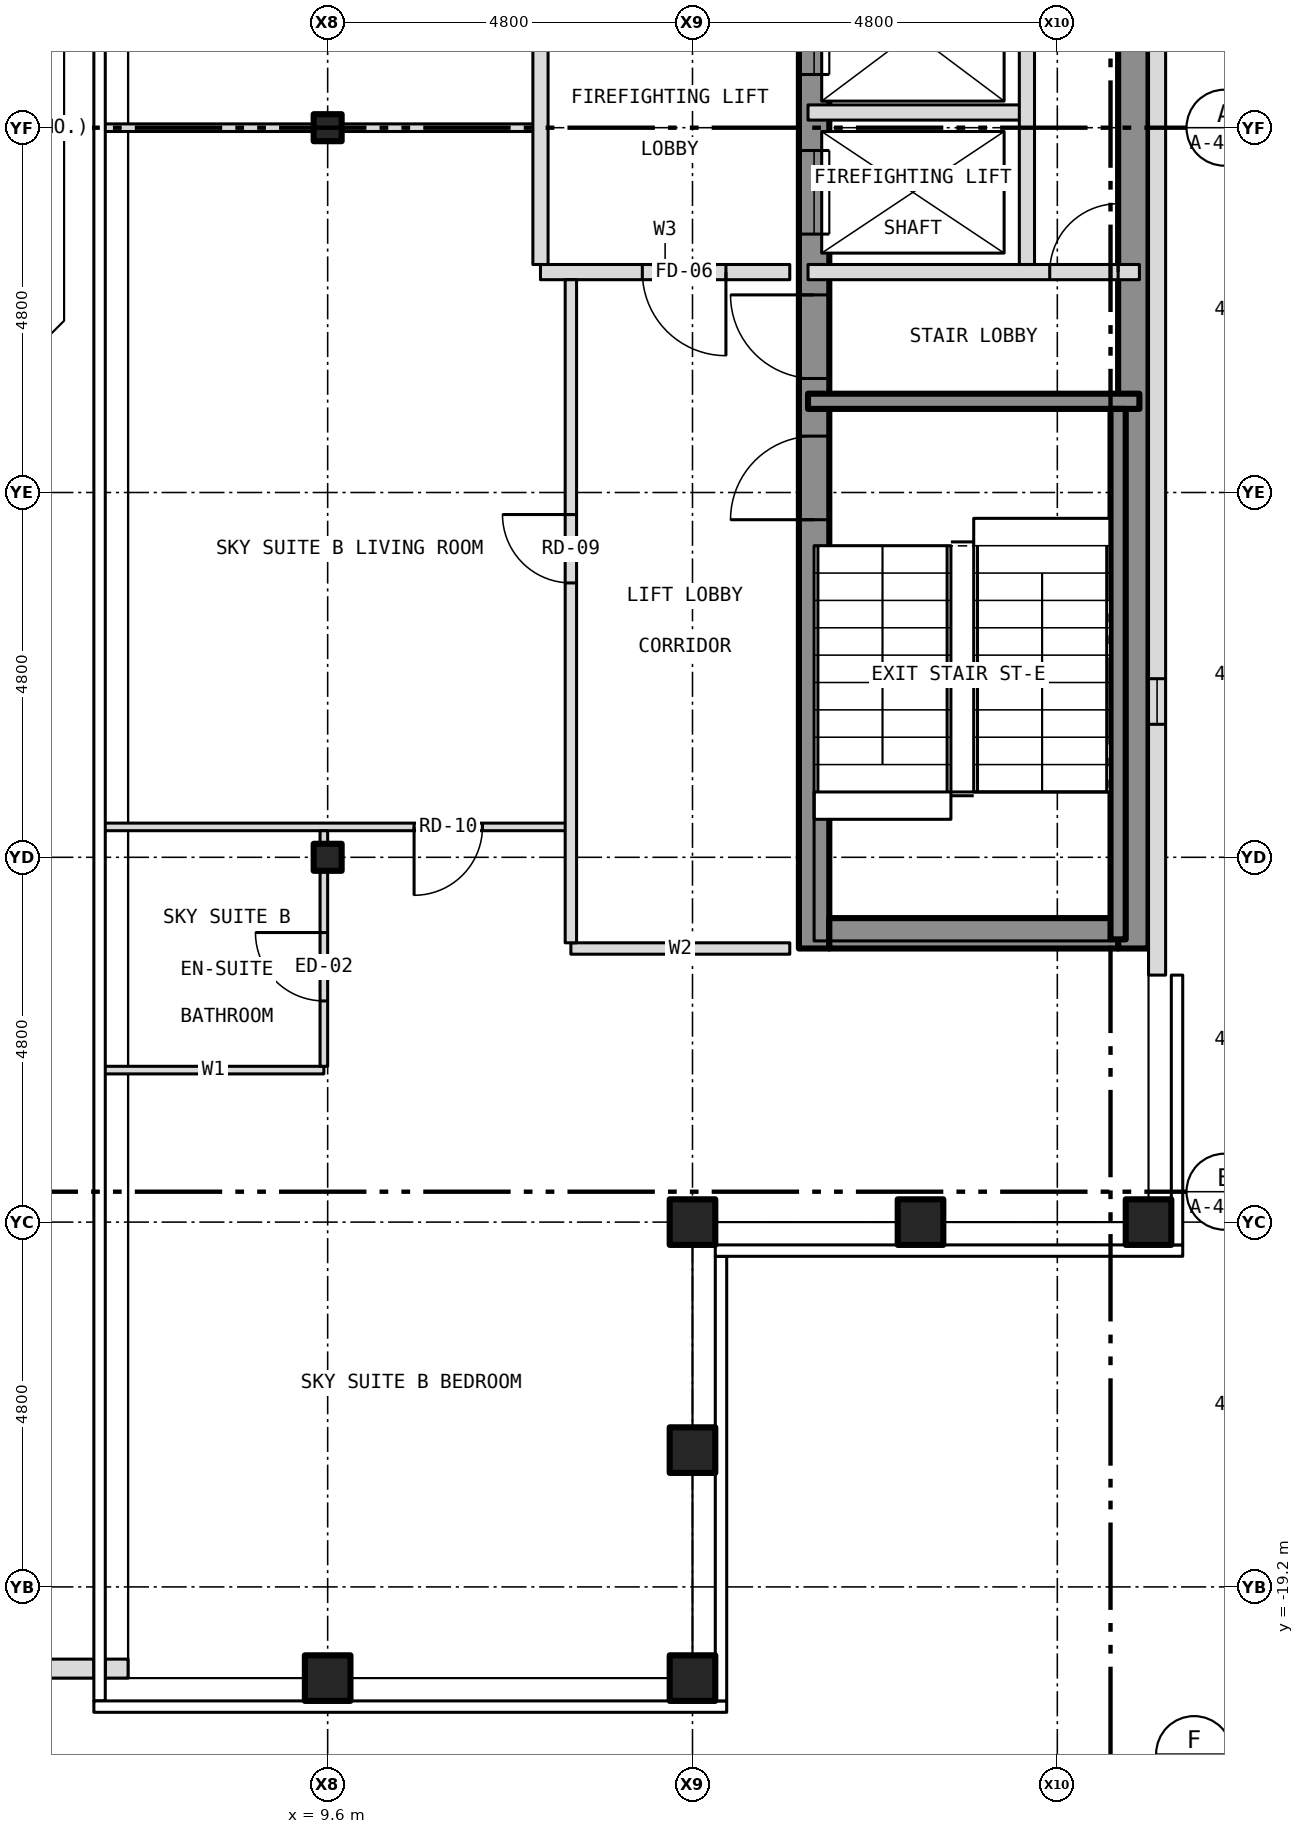
"""IFC4 building model, lengths in metres.
Left out: names, types, materials, properties, quantities, classifications, styles, units other than length and angle.
Written with IfcOpenShell. Run it as: python <this file> out.ifc"""

import sys

from ifc_helpers import new_model, si_unit, direction, frame, frame_2d, origin, origin_2d, place, context, subcontext, project, spatial, rectangle, hollow_rectangle, i_section, extrude, element, fill, save


model = new_model("IFC4")
c1 = context("Model", 3, precision=1e-05, world=origin(), true_north=direction((0.0, 1.0)))
c2 = subcontext(c1, "Body", "Model", "MODEL_VIEW")
j1 = project(units=[si_unit("LENGTHUNIT", "METRE"), si_unit("PLANEANGLEUNIT", "RADIAN")], contexts=[c1])
p1 = place(None, origin())
s1 = spatial("IfcSite", under=j1, at=p1, CompositionType="ELEMENT")
p2 = place(p1, origin())
s2 = spatial("IfcBuilding", under=s1, at=p2, CompositionType="ELEMENT")
p3 = place(p2, frame((0.0, 0.0, 265.5)))
s3 = spatial("IfcBuildingStorey", under=s2, at=p3, CompositionType="ELEMENT", Elevation=265.5)
for number, where, z_axis, x_axis in (
    (1, (9.6, -20.4, -0.25), (0.0, 0.0, 1.0), (1.0, 0.0, 0.0)),
    (2, (14.4, -20.4, -0.25), (0.0, 0.0, 1.0), (1.0, 0.0, 0.0)),
    (3, (20.4, -14.4, -0.25), (0.0, 0.0, 1.0), (1.0, 0.0, 0.0)),
    (4, (14.4, -14.4, -0.25), (0.0, 0.0, 1.0), (1.0, 0.0, 0.0)),
    (5, (14.4, -17.4, -0.25), (0.0, 0.0, 1.0), (1.0, 0.0, 0.0)),
    (6, (17.4, -14.4, -0.25), (0.0, 0.0, 1.0), (1.0, 0.0, 0.0)),
):
    element("IfcColumn", number, at=place(p3, frame(where, z_axis=z_axis, x_axis=x_axis)), inside=s3, PredefinedType="COLUMN", context=c2, shape_type="SweptSolid", body=[
        extrude(hollow_rectangle(XDim=0.6, YDim=0.6, WallThickness=0.03, at=origin_2d()), origin(), (0.0, 0.0, 1.0), 3.6),
    ])
for number, where, z_axis, x_axis in (
    (7, (9.6, -9.6, -0.25), (0.0, 0.0, 1.0), (1.0, 0.0, 0.0)),
    (8, (9.6, 0.0, -0.25), (0.0, 0.0, 1.0), (1.0, 0.0, 0.0)),
):
    element("IfcColumn", number, at=place(p3, frame(where, z_axis=z_axis, x_axis=x_axis)), inside=s3, PredefinedType="COLUMN", context=c2, shape_type="SweptSolid", body=[
        extrude(i_section(OverallWidth=0.368, OverallDepth=0.356, WebThickness=0.011, FlangeThickness=0.018, at=origin_2d()), origin(), (0.0, 0.0, 1.0), 3.6),
    ])
p4 = place(p3, frame((16.0, -10.8, 0.0), z_axis=(0.0, 0.0, 1.0), x_axis=(0.0, 1.0, 0.0)))
e9 = element("IfcWall", 9, at=p4, inside=s3, PredefinedType="SHEAR", context=c2, shape_type="SweptSolid", body=[
    extrude(rectangle(XDim=21.6, YDim=0.4, at=frame_2d((10.8, 0.0))), origin(), (0.0, 0.0, 1.0), 3.25),
])
p5 = place(p4, frame((9.4, 0.0, 0.0)))
e10 = element("IfcOpeningElement", 10, at=p5, cuts=e9, PredefinedType="OPENING", context=c2, shape_type="SweptSolid", body=[
    extrude(rectangle(XDim=1.1, YDim=2.1, at=frame_2d((0.55, 1.05))), frame((0.0, 0.212, 0.0), z_axis=(0.0, -1.0, 0.0), x_axis=(1.0, 0.0, 0.0)), (0.0, 0.0, 1.0), 0.424),
])
p6 = place(p4, frame((11.5, 0.0, 0.0)))
e11 = element("IfcOpeningElement", 11, at=p6, cuts=e9, PredefinedType="OPENING", context=c2, shape_type="SweptSolid", body=[
    extrude(rectangle(XDim=1.1, YDim=2.1, at=frame_2d((0.55, 1.05))), frame((0.0, 0.212, 0.0), z_axis=(0.0, -1.0, 0.0), x_axis=(1.0, 0.0, 0.0)), (0.0, 0.0, 1.0), 0.424),
])
p7 = place(p4, frame((13.6, 0.0, 0.0)))
e12 = element("IfcOpeningElement", 12, at=p7, cuts=e9, PredefinedType="OPENING", context=c2, shape_type="SweptSolid", body=[
    extrude(rectangle(XDim=1.1, YDim=2.1, at=frame_2d((0.55, 1.05))), frame((0.0, 0.212, 0.0), z_axis=(0.0, -1.0, 0.0), x_axis=(1.0, 0.0, 0.0)), (0.0, 0.0, 1.0), 0.424),
])
p8 = place(p4, frame((15.7, 0.0, 0.0)))
e13 = element("IfcOpeningElement", 13, at=p8, cuts=e9, PredefinedType="OPENING", context=c2, shape_type="SweptSolid", body=[
    extrude(rectangle(XDim=1.1, YDim=2.1, at=frame_2d((0.55, 1.05))), frame((0.0, 0.212, 0.0), z_axis=(0.0, -1.0, 0.0), x_axis=(1.0, 0.0, 0.0)), (0.0, 0.0, 1.0), 0.424),
])
p9 = place(p4, frame((17.8, 0.0, 0.0)))
e14 = element("IfcOpeningElement", 14, at=p9, cuts=e9, PredefinedType="OPENING", context=c2, shape_type="SweptSolid", body=[
    extrude(rectangle(XDim=1.1, YDim=2.1, at=frame_2d((0.55, 1.05))), frame((0.0, 0.212, 0.0), z_axis=(0.0, -1.0, 0.0), x_axis=(1.0, 0.0, 0.0)), (0.0, 0.0, 1.0), 0.424),
])
p10 = place(p4, frame((5.642, 0.0, 0.0)))
e15 = element("IfcOpeningElement", 15, at=p10, cuts=e9, PredefinedType="OPENING", context=c2, shape_type="SweptSolid", body=[
    extrude(rectangle(XDim=1.1, YDim=2.1, at=frame_2d((0.55, 1.05))), frame((0.0, 0.212, 0.0), z_axis=(0.0, -1.0, 0.0), x_axis=(1.0, 0.0, 0.0)), (0.0, 0.0, 1.0), 0.424),
])
p11 = place(p4, frame((7.5, 0.0, 0.0)))
e16 = element("IfcOpeningElement", 16, at=p11, cuts=e9, PredefinedType="OPENING", context=c2, shape_type="SweptSolid", body=[
    extrude(rectangle(XDim=1.1, YDim=2.1, at=frame_2d((0.55, 1.05))), frame((0.0, 0.212, 0.0), z_axis=(0.0, -1.0, 0.0), x_axis=(1.0, 0.0, 0.0)), (0.0, 0.0, 1.0), 0.424),
])
p12 = place(p4, frame((20.0, 0.0, 0.0)))
e17 = element("IfcOpeningElement", 17, at=p12, cuts=e9, PredefinedType="OPENING", context=c2, shape_type="SweptSolid", body=[
    extrude(rectangle(XDim=0.9, YDim=2.1, at=frame_2d((0.45, 1.05))), frame((0.0, 0.212, 0.0), z_axis=(0.0, -1.0, 0.0), x_axis=(1.0, 0.0, 0.0)), (0.0, 0.0, 1.0), 0.424),
])
p13 = place(p3, frame((20.2, -10.8, 0.0), z_axis=(0.0, 0.0, 1.0), x_axis=(0.0, 1.0, 0.0)))
e18 = element("IfcWall", 18, at=p13, inside=s3, PredefinedType="SHEAR", context=c2, shape_type="SweptSolid", body=[
    extrude(rectangle(XDim=21.6, YDim=0.4, at=frame_2d((10.8, 0.0))), origin(), (0.0, 0.0, 1.0), 3.25),
])
p14 = place(p3, frame((16.2, -10.6, 0.0), z_axis=(0.0, 0.0, 1.0), x_axis=(1.0, 0.0, 0.0)))
e19 = element("IfcWall", 19, at=p14, inside=s3, PredefinedType="SHEAR", context=c2, shape_type="SweptSolid", body=[
    extrude(rectangle(XDim=3.8, YDim=0.4, at=frame_2d((1.9, 0.0))), origin(), (0.0, 0.0, 1.0), 3.25),
])
p15 = place(p3, frame((20.512, -11.15, 0.0), z_axis=(0.0, 0.0, 1.0), x_axis=(0.0, 1.0, 0.0)))
e20 = element("IfcWall", 20, at=p15, inside=s3, PredefinedType="SOLIDWALL", context=c2, shape_type="SweptSolid", body=[
    extrude(rectangle(XDim=22.3, YDim=0.225, at=frame_2d((11.15, 0.0))), origin(), (0.0, 0.0, 1.0), 3.5),
])
p16 = place(p15, frame((3.3, 0.0, 1.0)))
e21 = element("IfcOpeningElement", 21, at=p16, cuts=e20, PredefinedType="OPENING", context=c2, shape_type="SweptSolid", body=[
    extrude(rectangle(XDim=0.6, YDim=1.5, at=frame_2d((0.3, 0.75))), frame((0.0, 0.125, 0.0), z_axis=(0.0, -1.0, 0.0), x_axis=(1.0, 0.0, 0.0)), (0.0, 0.0, 1.0), 0.249),
])
p17 = place(p3, frame((-6.524, -20.275, 0.0), z_axis=(0.0, 0.0, 1.0), x_axis=(1.0, 0.0, 0.0)))
e22 = element("IfcWall", 22, at=p17, inside=s3, PredefinedType="PARAPET", context=c2, shape_type="SweptSolid", body=[
    extrude(rectangle(XDim=13.048, YDim=0.25, at=frame_2d((6.524, 0.0))), origin(), (0.0, 0.0, 1.0), 1.1),
])
p18 = place(p3, frame((6.674, -20.275, 0.0), z_axis=(0.0, 0.0, 1.0), x_axis=(1.0, 0.0, 0.0)))
e23 = element("IfcWall", 23, at=p18, inside=s3, PredefinedType="PARAPET", context=c2, shape_type="SweptSolid", body=[
    extrude(rectangle(XDim=0.3, YDim=0.25, at=frame_2d((0.15, 0.0))), origin(), (0.0, 0.0, 1.0), 1.1),
])
p19 = place(p3, frame((6.644, -12.4, 0.0), z_axis=(0.0, 0.0, 1.0), x_axis=(1.0, 0.0, 0.0)))
e24 = element("IfcWall", 24, at=p19, inside=s3, PredefinedType="PARTITIONING", context=c2, shape_type="SweptSolid", body=[
    extrude(rectangle(XDim=2.906, YDim=0.1, at=frame_2d((1.453, 0.0))), origin(), (0.0, 0.0, 1.0), 3.35),
])
p20 = place(p3, frame((12.8, -10.8, 0.0), z_axis=(0.0, 0.0, 1.0), x_axis=(1.0, 0.0, 0.0)))
e25 = element("IfcWall", 25, at=p20, inside=s3, PredefinedType="PARTITIONING", context=c2, shape_type="SweptSolid", body=[
    extrude(rectangle(XDim=2.88, YDim=0.15, at=frame_2d((1.44, 0.0))), origin(), (0.0, 0.0, 1.0), 3.35),
])
p21 = place(p3, frame((6.644, -9.2, 0.0), z_axis=(0.0, 0.0, 1.0), x_axis=(1.0, 0.0, 0.0)))
e26 = element("IfcWall", 26, at=p21, inside=s3, PredefinedType="PARTITIONING", context=c2, shape_type="SweptSolid", body=[
    extrude(rectangle(XDim=6.156, YDim=0.1, at=frame_2d((3.078, 0.0))), origin(), (0.0, 0.0, 1.0), 3.35),
])
p22 = place(p21, frame((4.093, 0.0, 0.0)))
e27 = element("IfcOpeningElement", 27, at=p22, cuts=e26, PredefinedType="OPENING", context=c2, shape_type="SweptSolid", body=[
    extrude(rectangle(XDim=0.9, YDim=2.1, at=frame_2d((0.45, 1.05))), frame((0.0, 0.062, 0.0), z_axis=(0.0, -1.0, 0.0), x_axis=(1.0, 0.0, 0.0)), (0.0, 0.0, 1.0), 0.124),
])
p23 = place(p3, frame((15.92, -3.6, 0.0), z_axis=(0.0, 0.0, 1.0), x_axis=(1.0, 0.0, 0.0)))
e28 = element("IfcWall", 28, at=p23, inside=s3, PredefinedType="SHEAR", context=c2, shape_type="SweptSolid", body=[
    extrude(rectangle(XDim=4.36, YDim=0.2, at=frame_2d((2.18, 0.0))), origin(), (0.0, 0.0, 1.0), 3.25),
])
p24 = place(p3, frame((12.4, -1.9, 0.0), z_axis=(0.0, 0.0, 1.0), x_axis=(1.0, 0.0, 0.0)))
e29 = element("IfcWall", 29, at=p24, inside=s3, PredefinedType="PARTITIONING", context=c2, shape_type="SweptSolid", body=[
    extrude(rectangle(XDim=3.28, YDim=0.2, at=frame_2d((1.64, 0.0))), origin(), (0.0, 0.0, 1.0), 3.35),
])
p25 = place(p24, frame((1.34, 0.0, 0.0)))
e30 = element("IfcOpeningElement", 30, at=p25, cuts=e29, PredefinedType="OPENING", context=c2, shape_type="SweptSolid", body=[
    extrude(rectangle(XDim=1.1, YDim=2.1, at=frame_2d((0.55, 1.05))), frame((0.0, 0.112, 0.0), z_axis=(0.0, -1.0, 0.0), x_axis=(1.0, 0.0, 0.0)), (0.0, 0.0, 1.0), 0.224),
])
p26 = place(p3, frame((15.92, -1.9, 0.0), z_axis=(0.0, 0.0, 1.0), x_axis=(1.0, 0.0, 0.0)))
e31 = element("IfcWall", 31, at=p26, inside=s3, PredefinedType="PARTITIONING", context=c2, shape_type="SweptSolid", body=[
    extrude(rectangle(XDim=4.36, YDim=0.2, at=frame_2d((2.18, 0.0))), origin(), (0.0, 0.0, 1.0), 3.25),
])
p27 = place(p26, frame((3.18, 0.0, 0.0)))
e32 = element("IfcOpeningElement", 32, at=p27, cuts=e31, PredefinedType="OPENING", context=c2, shape_type="SweptSolid", body=[
    extrude(rectangle(XDim=0.9, YDim=2.1, at=frame_2d((0.45, 1.05))), frame((0.0, 0.112, 0.0), z_axis=(0.0, -1.0, 0.0), x_axis=(1.0, 0.0, 0.0)), (0.0, 0.0, 1.0), 0.224),
])
p28 = place(p3, frame((6.644, 0.0, 0.0), z_axis=(0.0, 0.0, 1.0), x_axis=(1.0, 0.0, 0.0)))
e33 = element("IfcWall", 33, at=p28, inside=s3, PredefinedType="PARTITIONING", context=c2, shape_type="SweptSolid", body=[
    extrude(rectangle(XDim=2.772, YDim=0.1, at=frame_2d((1.386, 0.0))), origin(), (0.0, 0.0, 1.0), 2.728),
])
p29 = place(p3, frame((9.416, 0.0, 0.0), z_axis=(0.0, 0.0, 1.0), x_axis=(1.0, 0.0, 0.0)))
e34 = element("IfcWall", 34, at=p29, inside=s3, PredefinedType="PARTITIONING", context=c2, shape_type="SweptSolid", body=[
    extrude(rectangle(XDim=0.368, YDim=0.1, at=frame_2d((0.184, 0.0))), origin(), (0.0, 0.0, 1.0), 3.35),
])
p30 = place(p3, frame((9.784, 0.0, 0.0), z_axis=(0.0, 0.0, 1.0), x_axis=(1.0, 0.0, 0.0)))
e35 = element("IfcWall", 35, at=p30, inside=s3, PredefinedType="PARTITIONING", context=c2, shape_type="SweptSolid", body=[
    extrude(rectangle(XDim=2.616, YDim=0.1, at=frame_2d((1.308, 0.0))), origin(), (0.0, 0.0, 1.0), 2.728),
])
p31 = place(p3, frame((15.92, 0.2, 0.0), z_axis=(0.0, 0.0, 1.0), x_axis=(1.0, 0.0, 0.0)))
e36 = element("IfcWall", 36, at=p31, inside=s3, PredefinedType="PARTITIONING", context=c2, shape_type="SweptSolid", body=[
    extrude(rectangle(XDim=2.88, YDim=0.2, at=frame_2d((1.44, 0.0))), origin(), (0.0, 0.0, 1.0), 3.25),
])
p32 = place(p3, frame((9.55, -12.35, 0.0), z_axis=(0.0, 0.0, 1.0), x_axis=(0.0, 1.0, 0.0)))
e37 = element("IfcWall", 37, at=p32, inside=s3, PredefinedType="PARTITIONING", context=c2, shape_type="SweptSolid", body=[
    extrude(rectangle(XDim=2.566, YDim=0.1, at=frame_2d((1.283, 0.0))), origin(), (0.0, 0.0, 1.0), 2.728),
])
p33 = place(p32, frame((0.86, 0.0, 0.0)))
e38 = element("IfcOpeningElement", 38, at=p33, cuts=e37, PredefinedType="OPENING", context=c2, shape_type="SweptSolid", body=[
    extrude(rectangle(XDim=0.9, YDim=2.1, at=frame_2d((0.45, 1.05))), frame((0.0, 0.062, 0.0), z_axis=(0.0, -1.0, 0.0), x_axis=(1.0, 0.0, 0.0)), (0.0, 0.0, 1.0), 0.124),
])
p34 = place(p3, frame((9.55, -9.784, 0.0), z_axis=(0.0, 0.0, 1.0), x_axis=(0.0, 1.0, 0.0)))
e39 = element("IfcWall", 39, at=p34, inside=s3, PredefinedType="PARTITIONING", context=c2, shape_type="SweptSolid", body=[
    extrude(rectangle(XDim=0.534, YDim=0.1, at=frame_2d((0.267, 0.0))), origin(), (0.0, 0.0, 1.0), 3.35),
])
p35 = place(p3, frame((12.4, -1.8, 0.0), z_axis=(0.0, 0.0, 1.0), x_axis=(0.0, 1.0, 0.0)))
e40 = element("IfcWall", 40, at=p35, inside=s3, PredefinedType="PARTITIONING", context=c2, shape_type="SweptSolid", body=[
    extrude(rectangle(XDim=4.0, YDim=0.2, at=frame_2d((2.0, 0.0))), origin(), (0.0, 0.0, 1.0), 3.35),
])
p36 = place(p3, frame((12.8, -10.725, 0.0), z_axis=(0.0, 0.0, 1.0), x_axis=(0.0, 1.0, 0.0)))
e41 = element("IfcWall", 41, at=p36, inside=s3, PredefinedType="PARTITIONING", context=c2, shape_type="SweptSolid", body=[
    extrude(rectangle(XDim=8.725, YDim=0.15, at=frame_2d((4.363, 0.0))), origin(), (0.0, 0.0, 1.0), 3.35),
])
p37 = place(p36, frame((4.735, 0.0, 0.0)))
e42 = element("IfcOpeningElement", 42, at=p37, cuts=e41, PredefinedType="OPENING", context=c2, shape_type="SweptSolid", body=[
    extrude(rectangle(XDim=0.9, YDim=2.1, at=frame_2d((0.45, 1.05))), frame((0.0, 0.087, 0.0), z_axis=(0.0, -1.0, 0.0), x_axis=(1.0, 0.0, 0.0)), (0.0, 0.0, 1.0), 0.174),
])
p38 = place(p3, frame((18.8, -1.8, 0.0), z_axis=(0.0, 0.0, 1.0), x_axis=(0.0, 1.0, 0.0)))
e43 = element("IfcWall", 43, at=p38, inside=s3, PredefinedType="PARTITIONING", context=c2, shape_type="SweptSolid", body=[
    extrude(rectangle(XDim=12.48, YDim=0.2, at=frame_2d((6.24, 0.0))), origin(), (0.0, 0.0, 1.0), 3.25),
])
p39 = place(p3, frame((20.0, -10.68, 0.0), z_axis=(0.0, 0.0, 1.0), x_axis=(0.0, 1.0, 0.0)))
e44 = element("IfcWall", 44, at=p39, inside=s3, PredefinedType="SHEAR", context=c2, shape_type="SweptSolid", body=[
    extrude(rectangle(XDim=6.98, YDim=0.2, at=frame_2d((3.49, 0.0))), origin(), (0.0, 0.0, 1.0), 3.25),
])
p40 = place(p16, origin())
e45 = element("IfcWindow", 45, at=p40, inside=s3, PartitioningType="SINGLE_PANEL", PredefinedType="WINDOW", context=c2, shape_type="SweptSolid", body=[
    extrude(rectangle(XDim=0.6, YDim=1.5, at=frame_2d((0.3, 0.75))), frame((0.0, -0.022, 0.0), z_axis=(0.0, -1.0, 0.0), x_axis=(1.0, 0.0, 0.0)), (0.0, 0.0, 1.0), 0.06),
])
fill(e21, e45)
p41 = place(p5, origin())
e46 = element("IfcDoor", 46, at=p41, inside=s3, OperationType="SLIDING_TO_LEFT", PredefinedType="DOOR", context=c2, shape_type="SweptSolid", body=[
    extrude(rectangle(XDim=1.1, YDim=2.1, at=frame_2d((0.55, 1.05))), frame((0.0, 0.025, 0.0), z_axis=(0.0, -1.0, 0.0), x_axis=(1.0, 0.0, 0.0)), (0.0, 0.0, 1.0), 0.05),
])
fill(e10, e46)
p42 = place(p6, origin())
e47 = element("IfcDoor", 47, at=p42, inside=s3, OperationType="SLIDING_TO_LEFT", PredefinedType="DOOR", context=c2, shape_type="SweptSolid", body=[
    extrude(rectangle(XDim=1.1, YDim=2.1, at=frame_2d((0.55, 1.05))), frame((0.0, 0.025, 0.0), z_axis=(0.0, -1.0, 0.0), x_axis=(1.0, 0.0, 0.0)), (0.0, 0.0, 1.0), 0.05),
])
fill(e11, e47)
p43 = place(p10, origin())
e48 = element("IfcDoor", 48, at=p43, inside=s3, OperationType="SINGLE_SWING_LEFT", PredefinedType="DOOR", context=c2, shape_type="SweptSolid", body=[
    extrude(rectangle(XDim=1.1, YDim=2.1, at=frame_2d((0.55, 1.05))), frame((0.0, 0.025, 0.0), z_axis=(0.0, -1.0, 0.0), x_axis=(1.0, 0.0, 0.0)), (0.0, 0.0, 1.0), 0.05),
])
fill(e15, e48)
p44 = place(p11, origin())
e49 = element("IfcDoor", 49, at=p44, inside=s3, OperationType="SINGLE_SWING_RIGHT", PredefinedType="DOOR", context=c2, shape_type="SweptSolid", body=[
    extrude(rectangle(XDim=1.1, YDim=2.1, at=frame_2d((0.55, 1.05))), frame((0.0, 0.025, 0.0), z_axis=(0.0, -1.0, 0.0), x_axis=(1.0, 0.0, 0.0)), (0.0, 0.0, 1.0), 0.05),
])
fill(e16, e49)
p45 = place(p27, origin())
e50 = element("IfcDoor", 50, at=p45, inside=s3, OperationType="SINGLE_SWING_RIGHT", PredefinedType="DOOR", context=c2, shape_type="SweptSolid", body=[
    extrude(rectangle(XDim=0.9, YDim=2.1, at=frame_2d((0.45, 1.05))), frame((0.0, 0.025, 0.0), z_axis=(0.0, -1.0, 0.0), x_axis=(1.0, 0.0, 0.0)), (0.0, 0.0, 1.0), 0.05),
])
fill(e32, e50)
p46 = place(p25, origin())
e51 = element("IfcDoor", 51, at=p46, inside=s3, OperationType="SINGLE_SWING_RIGHT", PredefinedType="DOOR", context=c2, shape_type="SweptSolid", body=[
    extrude(rectangle(XDim=1.1, YDim=2.1, at=frame_2d((0.55, 1.05))), frame((0.0, 0.025, 0.0), z_axis=(0.0, -1.0, 0.0), x_axis=(1.0, 0.0, 0.0)), (0.0, 0.0, 1.0), 0.05),
])
fill(e30, e51)
p47 = place(p37, origin())
e52 = element("IfcDoor", 52, at=p47, inside=s3, OperationType="SINGLE_SWING_RIGHT", PredefinedType="DOOR", context=c2, shape_type="SweptSolid", body=[
    extrude(rectangle(XDim=0.9, YDim=2.1, at=frame_2d((0.45, 1.05))), frame((0.0, 0.025, 0.0), z_axis=(0.0, -1.0, 0.0), x_axis=(1.0, 0.0, 0.0)), (0.0, 0.0, 1.0), 0.05),
])
fill(e42, e52)
p48 = place(p22, origin())
e53 = element("IfcDoor", 53, at=p48, inside=s3, OperationType="SINGLE_SWING_LEFT", PredefinedType="DOOR", context=c2, shape_type="SweptSolid", body=[
    extrude(rectangle(XDim=0.9, YDim=2.1, at=frame_2d((0.45, 1.05))), frame((0.0, 0.025, 0.0), z_axis=(0.0, -1.0, 0.0), x_axis=(1.0, 0.0, 0.0)), (0.0, 0.0, 1.0), 0.05),
])
fill(e27, e53)
p49 = place(p33, origin())
e54 = element("IfcDoor", 54, at=p49, inside=s3, OperationType="SINGLE_SWING_RIGHT", PredefinedType="DOOR", context=c2, shape_type="SweptSolid", body=[
    extrude(rectangle(XDim=0.9, YDim=2.1, at=frame_2d((0.45, 1.05))), frame((0.0, 0.025, 0.0), z_axis=(0.0, -1.0, 0.0), x_axis=(1.0, 0.0, 0.0)), (0.0, 0.0, 1.0), 0.05),
])
fill(e38, e54)
save(model, sys.argv[1])
